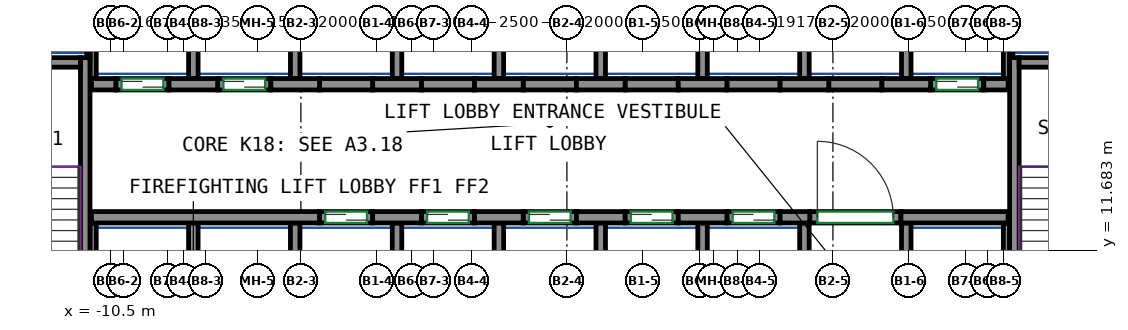
"""IFC4 building model, lengths in metres.
Left out: names, types, materials, properties, quantities, classifications, styles, units other than length and angle.
Written with IfcOpenShell. Run it as: python <this file> out.ifc"""

import sys

from ifc_helpers import new_model, si_unit, direction, frame, frame_2d, origin, place, context, subcontext, project, spatial, rectangle, extrude, source, transform, mapped, element, fill, save


model = new_model("IFC4")
c1 = context("Model", 3, precision=1e-05, world=origin(), true_north=direction((0.0, 1.0)))
c2 = subcontext(c1, "Body", "Model", "MODEL_VIEW")
j1 = project(units=[si_unit("LENGTHUNIT", "METRE"), si_unit("PLANEANGLEUNIT", "RADIAN")], contexts=[c1])
p1 = place(None, origin())
s1 = spatial("IfcSite", under=j1, at=p1, CompositionType="ELEMENT")
p2 = place(p1, origin())
s2 = spatial("IfcBuilding", under=s1, at=p2, CompositionType="ELEMENT")
p3 = place(p2, frame((0.0, 0.0, 75.2)))
s3 = spatial("IfcBuildingStorey", under=s2, at=p3, CompositionType="ELEMENT", Elevation=75.2)
m1 = source(origin(), c2, "Body", "SweptSolid", [
    extrude(rectangle(XDim=7.75, YDim=0.25, at=frame_2d((3.875, 0.0))), origin(), (0.0, 0.0, 1.0), 3.72),
])
p4 = place(p3, frame((-11.175, 9.0, 0.0), z_axis=(0.0, 0.0, 1.0), x_axis=(0.0, 1.0, 0.0)))
e1 = element("IfcWall", 1, at=p4, inside=s3, PredefinedType="SHEAR", context=c2, shape_type="MappedRepresentation", body=[
    mapped(m1, transform((0.0, 0.0, 0.0))),
])
m2 = source(origin(), c2, "Body", "SweptSolid", [
    extrude(rectangle(XDim=3.7, YDim=0.25, at=frame_2d((1.85, 0.0))), origin(), (0.0, 0.0, 1.0), 3.72),
])
p5 = place(p3, frame((-15.0, 16.625, 0.0), z_axis=(0.0, 0.0, 1.0), x_axis=(1.0, 0.0, 0.0)))
e2 = element("IfcWall", 2, at=p5, inside=s3, PredefinedType="SHEAR", context=c2, shape_type="MappedRepresentation", body=[
    mapped(m2, transform((0.0, 0.0, 0.0))),
])
p6 = place(p3, frame((13.275, 9.0, 0.0), z_axis=(0.0, 0.0, 1.0), x_axis=(0.0, 1.0, 0.0)))
e3 = element("IfcWall", 3, at=p6, inside=s3, PredefinedType="SHEAR", context=c2, shape_type="MappedRepresentation", body=[
    mapped(m1, transform((0.0, 0.0, 0.0))),
])
m3 = source(origin(), c2, "Body", "SweptSolid", [
    extrude(rectangle(XDim=3.7, YDim=0.25, at=frame_2d((1.85, 0.0))), origin(), (0.0, 0.0, 1.0), 3.72),
])
p7 = place(p3, frame((13.4, 16.625, 0.0), z_axis=(0.0, 0.0, 1.0), x_axis=(1.0, 0.0, 0.0)))
e4 = element("IfcWall", 4, at=p7, inside=s3, PredefinedType="SHEAR", context=c2, shape_type="MappedRepresentation", body=[
    mapped(m3, transform((0.0, 0.0, 0.0))),
])
m4 = source(origin(), c2, "Body", "SweptSolid", [
    extrude(rectangle(XDim=6.0, YDim=0.3, at=frame_2d((3.0, 0.0))), origin(), (0.0, 0.0, 1.0), 3.72),
])
p8 = place(p3, frame((-11.01, 12.55, 0.0), z_axis=(0.0, 0.0, 1.0), x_axis=(1.0, 0.0, 0.0)))
e5 = element("IfcWall", 5, at=p8, inside=s3, PredefinedType="SHEAR", context=c2, shape_type="MappedRepresentation", body=[
    mapped(m4, transform((0.0, 0.0, 0.0))),
])
m5 = source(origin(), c2, "Body", "SweptSolid", [
    extrude(rectangle(XDim=1.28, YDim=0.3, at=frame_2d((0.64, 0.0))), origin(), (0.0, 0.0, 1.0), 3.72),
])
for number, where, z_axis, x_axis in (
    (6, (-3.61, 12.55, 0.0), (0.0, 0.0, 1.0), (1.0, 0.0, 0.0)),
    (7, (-0.93, 12.55, 0.0), (0.0, 0.0, 1.0), (1.0, 0.0, 0.0)),
    (8, (1.75, 12.55, 0.0), (0.0, 0.0, 1.0), (1.0, 0.0, 0.0)),
    (9, (4.43, 12.55, 0.0), (0.0, 0.0, 1.0), (1.0, 0.0, 0.0)),
):
    element("IfcWall", number, at=place(p3, frame(where, z_axis=z_axis, x_axis=x_axis)), inside=s3, PredefinedType="SHEAR", context=c2, shape_type="MappedRepresentation", body=[
        mapped(m5, transform((0.0, 0.0, 0.0))),
    ])
m6 = source(origin(), c2, "Body", "SweptSolid", [
    extrude(rectangle(XDim=0.78, YDim=0.3, at=frame_2d((0.39, 0.0))), origin(), (0.0, 0.0, 1.0), 3.72),
])
p9 = place(p3, frame((7.11, 12.55, 0.0), z_axis=(0.0, 0.0, 1.0), x_axis=(1.0, 0.0, 0.0)))
e10 = element("IfcWall", 10, at=p9, inside=s3, PredefinedType="SHEAR", context=c2, shape_type="MappedRepresentation", body=[
    mapped(m6, transform((0.0, 0.0, 0.0))),
])
m7 = source(origin(), c2, "Body", "SweptSolid", [
    extrude(rectangle(XDim=2.82, YDim=0.3, at=frame_2d((1.41, 0.0))), origin(), (0.0, 0.0, 1.0), 3.72),
])
p10 = place(p3, frame((10.29, 12.55, 0.0), z_axis=(0.0, 0.0, 1.0), x_axis=(1.0, 0.0, 0.0)))
e11 = element("IfcWall", 11, at=p10, inside=s3, PredefinedType="SHEAR", context=c2, shape_type="MappedRepresentation", body=[
    mapped(m7, transform((0.0, 0.0, 0.0))),
])
m8 = source(origin(), c2, "Body", "SweptSolid", [
    extrude(rectangle(XDim=0.64, YDim=0.3, at=frame_2d((0.32, 0.0))), origin(), (0.0, 0.0, 1.0), 3.72),
])
p11 = place(p3, frame((-11.01, 16.05, 0.0), z_axis=(0.0, 0.0, 1.0), x_axis=(1.0, 0.0, 0.0)))
e12 = element("IfcWall", 12, at=p11, inside=s3, PredefinedType="SHEAR", context=c2, shape_type="MappedRepresentation", body=[
    mapped(m8, transform((0.0, 0.0, 0.0))),
])
for number, where, z_axis, x_axis in (
    (13, (-8.97, 16.05, 0.0), (0.0, 0.0, 1.0), (1.0, 0.0, 0.0)),
    (14, (-6.29, 16.05, 0.0), (0.0, 0.0, 1.0), (1.0, 0.0, 0.0)),
    (15, (-3.61, 16.05, 0.0), (0.0, 0.0, 1.0), (1.0, 0.0, 0.0)),
    (16, (-0.93, 16.05, 0.0), (0.0, 0.0, 1.0), (1.0, 0.0, 0.0)),
    (17, (1.75, 16.05, 0.0), (0.0, 0.0, 1.0), (1.0, 0.0, 0.0)),
    (18, (4.43, 16.05, 0.0), (0.0, 0.0, 1.0), (1.0, 0.0, 0.0)),
):
    element("IfcWall", number, at=place(p3, frame(where, z_axis=z_axis, x_axis=x_axis)), inside=s3, PredefinedType="SHEAR", context=c2, shape_type="MappedRepresentation", body=[
        mapped(m5, transform((0.0, 0.0, 0.0))),
    ])
m9 = source(origin(), c2, "Body", "SweptSolid", [
    extrude(rectangle(XDim=1.28, YDim=0.3, at=frame_2d((0.64, 0.0))), origin(), (0.0, 0.0, 1.0), 3.72),
])
p12 = place(p3, frame((7.11, 16.05, 0.0), z_axis=(0.0, 0.0, 1.0), x_axis=(1.0, 0.0, 0.0)))
e19 = element("IfcWall", 19, at=p12, inside=s3, PredefinedType="SHEAR", context=c2, shape_type="MappedRepresentation", body=[
    mapped(m9, transform((0.0, 0.0, 0.0))),
])
p13 = place(p3, frame((9.79, 16.05, 0.0), z_axis=(0.0, 0.0, 1.0), x_axis=(1.0, 0.0, 0.0)))
e20 = element("IfcWall", 20, at=p13, inside=s3, PredefinedType="SHEAR", context=c2, shape_type="MappedRepresentation", body=[
    mapped(m5, transform((0.0, 0.0, 0.0))),
])
m10 = source(origin(), c2, "Body", "SweptSolid", [
    extrude(rectangle(XDim=0.64, YDim=0.3, at=frame_2d((0.32, 0.0))), origin(), (0.0, 0.0, 1.0), 3.72),
])
p14 = place(p3, frame((12.47, 16.05, 0.0), z_axis=(0.0, 0.0, 1.0), x_axis=(1.0, 0.0, 0.0)))
e21 = element("IfcWall", 21, at=p14, inside=s3, PredefinedType="SHEAR", context=c2, shape_type="MappedRepresentation", body=[
    mapped(m10, transform((0.0, 0.0, 0.0))),
])
m11 = source(origin(), c2, "Body", "SweptSolid", [
    extrude(rectangle(XDim=1.4, YDim=0.3, at=frame_2d((0.7, 0.0))), origin(), (0.0, 0.0, 1.0), 3.72),
])
p15 = place(p3, frame((-5.01, 12.55, 0.0), z_axis=(0.0, 0.0, 1.0), x_axis=(1.0, 0.0, 0.0)))
e22 = element("IfcWall", 22, at=p15, inside=s3, PredefinedType="PARTITIONING", context=c2, shape_type="MappedRepresentation", body=[
    mapped(m11, transform((0.0, 0.0, 0.0))),
])
p16 = place(p15, frame((0.15, 0.0, 0.0)))
e23 = element("IfcOpeningElement", 23, at=p16, cuts=e22, PredefinedType="OPENING", context=c2, shape_type="SweptSolid", body=[
    extrude(rectangle(XDim=1.1, YDim=2.1, at=frame_2d((0.55, 1.05))), frame((0.0, 0.16, 0.0), z_axis=(0.0, -1.0, 0.0), x_axis=(1.0, 0.0, 0.0)), (0.0, 0.0, 1.0), 0.32),
])
m12 = source(origin(), c2, "Body", "SweptSolid", [
    extrude(rectangle(XDim=1.4, YDim=0.3, at=frame_2d((0.7, 0.0))), origin(), (0.0, 0.0, 1.0), 3.72),
])
p17 = place(p3, frame((-2.33, 12.55, 0.0), z_axis=(0.0, 0.0, 1.0), x_axis=(1.0, 0.0, 0.0)))
e24 = element("IfcWall", 24, at=p17, inside=s3, PredefinedType="PARTITIONING", context=c2, shape_type="MappedRepresentation", body=[
    mapped(m12, transform((0.0, 0.0, 0.0))),
])
p18 = place(p17, frame((0.15, 0.0, 0.0)))
e25 = element("IfcOpeningElement", 25, at=p18, cuts=e24, PredefinedType="OPENING", context=c2, shape_type="SweptSolid", body=[
    extrude(rectangle(XDim=1.1, YDim=2.1, at=frame_2d((0.55, 1.05))), frame((0.0, 0.16, 0.0), z_axis=(0.0, -1.0, 0.0), x_axis=(1.0, 0.0, 0.0)), (0.0, 0.0, 1.0), 0.32),
])
p19 = place(p3, frame((0.35, 12.55, 0.0), z_axis=(0.0, 0.0, 1.0), x_axis=(1.0, 0.0, 0.0)))
e26 = element("IfcWall", 26, at=p19, inside=s3, PredefinedType="PARTITIONING", context=c2, shape_type="MappedRepresentation", body=[
    mapped(m11, transform((0.0, 0.0, 0.0))),
])
p20 = place(p19, frame((0.15, 0.0, 0.0)))
e27 = element("IfcOpeningElement", 27, at=p20, cuts=e26, PredefinedType="OPENING", context=c2, shape_type="SweptSolid", body=[
    extrude(rectangle(XDim=1.1, YDim=2.1, at=frame_2d((0.55, 1.05))), frame((0.0, 0.16, 0.0), z_axis=(0.0, -1.0, 0.0), x_axis=(1.0, 0.0, 0.0)), (0.0, 0.0, 1.0), 0.32),
])
p21 = place(p3, frame((3.03, 12.55, 0.0), z_axis=(0.0, 0.0, 1.0), x_axis=(1.0, 0.0, 0.0)))
e28 = element("IfcWall", 28, at=p21, inside=s3, PredefinedType="PARTITIONING", context=c2, shape_type="MappedRepresentation", body=[
    mapped(m11, transform((0.0, 0.0, 0.0))),
])
p22 = place(p21, frame((0.15, 0.0, 0.0)))
e29 = element("IfcOpeningElement", 29, at=p22, cuts=e28, PredefinedType="OPENING", context=c2, shape_type="SweptSolid", body=[
    extrude(rectangle(XDim=1.1, YDim=2.1, at=frame_2d((0.55, 1.05))), frame((0.0, 0.16, 0.0), z_axis=(0.0, -1.0, 0.0), x_axis=(1.0, 0.0, 0.0)), (0.0, 0.0, 1.0), 0.32),
])
p23 = place(p3, frame((5.71, 12.55, 0.0), z_axis=(0.0, 0.0, 1.0), x_axis=(1.0, 0.0, 0.0)))
e30 = element("IfcWall", 30, at=p23, inside=s3, PredefinedType="PARTITIONING", context=c2, shape_type="MappedRepresentation", body=[
    mapped(m12, transform((0.0, 0.0, 0.0))),
])
p24 = place(p23, frame((0.15, 0.0, 0.0)))
e31 = element("IfcOpeningElement", 31, at=p24, cuts=e30, PredefinedType="OPENING", context=c2, shape_type="SweptSolid", body=[
    extrude(rectangle(XDim=1.1, YDim=2.1, at=frame_2d((0.55, 1.05))), frame((0.0, 0.16, 0.0), z_axis=(0.0, -1.0, 0.0), x_axis=(1.0, 0.0, 0.0)), (0.0, 0.0, 1.0), 0.32),
])
p25 = place(p3, frame((11.07, 16.05, 0.0), z_axis=(0.0, 0.0, 1.0), x_axis=(1.0, 0.0, 0.0)))
e32 = element("IfcWall", 32, at=p25, inside=s3, PredefinedType="PARTITIONING", context=c2, shape_type="MappedRepresentation", body=[
    mapped(m11, transform((0.0, 0.0, 0.0))),
])
p26 = place(p25, frame((0.15, 0.0, 0.0)))
e33 = element("IfcOpeningElement", 33, at=p26, cuts=e32, PredefinedType="OPENING", context=c2, shape_type="SweptSolid", body=[
    extrude(rectangle(XDim=1.1, YDim=2.1, at=frame_2d((0.55, 1.05))), frame((0.0, 0.16, 0.0), z_axis=(0.0, -1.0, 0.0), x_axis=(1.0, 0.0, 0.0)), (0.0, 0.0, 1.0), 0.32),
])
p27 = place(p3, frame((-10.37, 16.05, 0.0), z_axis=(0.0, 0.0, 1.0), x_axis=(1.0, 0.0, 0.0)))
e34 = element("IfcWall", 34, at=p27, inside=s3, PredefinedType="PARTITIONING", context=c2, shape_type="MappedRepresentation", body=[
    mapped(m12, transform((0.0, 0.0, 0.0))),
])
p28 = place(p27, frame((0.15, 0.0, 0.0)))
e35 = element("IfcOpeningElement", 35, at=p28, cuts=e34, PredefinedType="OPENING", context=c2, shape_type="SweptSolid", body=[
    extrude(rectangle(XDim=1.1, YDim=2.1, at=frame_2d((0.55, 1.05))), frame((0.0, 0.16, 0.0), z_axis=(0.0, -1.0, 0.0), x_axis=(1.0, 0.0, 0.0)), (0.0, 0.0, 1.0), 0.32),
])
p29 = place(p3, frame((-7.69, 16.05, 0.0), z_axis=(0.0, 0.0, 1.0), x_axis=(1.0, 0.0, 0.0)))
e36 = element("IfcWall", 36, at=p29, inside=s3, PredefinedType="PARTITIONING", context=c2, shape_type="MappedRepresentation", body=[
    mapped(m11, transform((0.0, 0.0, 0.0))),
])
p30 = place(p29, frame((0.15, 0.0, 0.0)))
e37 = element("IfcOpeningElement", 37, at=p30, cuts=e36, PredefinedType="OPENING", context=c2, shape_type="SweptSolid", body=[
    extrude(rectangle(XDim=1.1, YDim=2.1, at=frame_2d((0.55, 1.05))), frame((0.0, 0.16, 0.0), z_axis=(0.0, -1.0, 0.0), x_axis=(1.0, 0.0, 0.0)), (0.0, 0.0, 1.0), 0.32),
])
m13 = source(origin(), c2, "Body", "SweptSolid", [
    extrude(rectangle(XDim=2.4, YDim=0.3, at=frame_2d((1.2, 0.0))), origin(), (0.0, 0.0, 1.0), 3.72),
])
p31 = place(p3, frame((7.89, 12.55, 0.0), z_axis=(0.0, 0.0, 1.0), x_axis=(1.0, 0.0, 0.0)))
e38 = element("IfcWall", 38, at=p31, inside=s3, PredefinedType="PARTITIONING", context=c2, shape_type="MappedRepresentation", body=[
    mapped(m13, transform((0.0, 0.0, 0.0))),
])
p32 = place(p31, frame((0.2, 0.0, 0.0)))
e39 = element("IfcOpeningElement", 39, at=p32, cuts=e38, PredefinedType="OPENING", context=c2, shape_type="SweptSolid", body=[
    extrude(rectangle(XDim=2.0, YDim=2.1, at=frame_2d((1.0, 1.05))), frame((0.0, 0.16, 0.0), z_axis=(0.0, -1.0, 0.0), x_axis=(1.0, 0.0, 0.0)), (0.0, 0.0, 1.0), 0.32),
])
p33 = place(p3, frame((-5.01, 16.05, 0.0), z_axis=(0.0, 0.0, 1.0), x_axis=(1.0, 0.0, 0.0)))
e40 = element("IfcWall", 40, at=p33, inside=s3, PredefinedType="PARTITIONING", context=c2, shape_type="MappedRepresentation", body=[
    mapped(m11, transform((0.0, 0.0, 0.0))),
])
p34 = place(p3, frame((-2.33, 16.05, 0.0), z_axis=(0.0, 0.0, 1.0), x_axis=(1.0, 0.0, 0.0)))
e41 = element("IfcWall", 41, at=p34, inside=s3, PredefinedType="PARTITIONING", context=c2, shape_type="MappedRepresentation", body=[
    mapped(m12, transform((0.0, 0.0, 0.0))),
])
for number, where, z_axis, x_axis in (
    (42, (0.35, 16.05, 0.0), (0.0, 0.0, 1.0), (1.0, 0.0, 0.0)),
    (43, (3.03, 16.05, 0.0), (0.0, 0.0, 1.0), (1.0, 0.0, 0.0)),
):
    element("IfcWall", number, at=place(p3, frame(where, z_axis=z_axis, x_axis=x_axis)), inside=s3, PredefinedType="PARTITIONING", context=c2, shape_type="MappedRepresentation", body=[
        mapped(m11, transform((0.0, 0.0, 0.0))),
    ])
for number, where, z_axis, x_axis in (
    (44, (5.71, 16.05, 0.0), (0.0, 0.0, 1.0), (1.0, 0.0, 0.0)),
    (45, (8.39, 16.05, 0.0), (0.0, 0.0, 1.0), (1.0, 0.0, 0.0)),
):
    element("IfcWall", number, at=place(p3, frame(where, z_axis=z_axis, x_axis=x_axis)), inside=s3, PredefinedType="PARTITIONING", context=c2, shape_type="MappedRepresentation", body=[
        mapped(m12, transform((0.0, 0.0, 0.0))),
    ])
m14 = source(origin(), c2, "Body", "SweptSolid", [
    extrude(rectangle(XDim=3.275, YDim=0.165, at=frame_2d((1.638, 0.0))), origin(), (0.0, 0.0, 1.0), 3.72),
])
for number, where, z_axis, x_axis in (
    (46, (13.067, 16.2, 0.0), (0.0, 0.0, 1.0), (0.0, 1.0, 0.0)),
    (47, (-10.968, 16.2, 0.0), (0.0, 0.0, 1.0), (0.0, 1.0, 0.0)),
):
    element("IfcWall", number, at=place(p3, frame(where, z_axis=z_axis, x_axis=x_axis)), inside=s3, PredefinedType="PARTITIONING", context=c2, shape_type="MappedRepresentation", body=[
        mapped(m14, transform((0.0, 0.0, 0.0))),
    ])
m15 = source(origin(), c2, "Body", "SweptSolid", [
    extrude(rectangle(XDim=3.275, YDim=0.25, at=frame_2d((1.638, 0.0))), origin(), (0.0, 0.0, 1.0), 3.72),
])
p35 = place(p3, frame((10.43, 16.2, 0.0), z_axis=(0.0, 0.0, 1.0), x_axis=(0.0, 1.0, 0.0)))
e48 = element("IfcWall", 48, at=p35, inside=s3, PredefinedType="PARTITIONING", context=c2, shape_type="MappedRepresentation", body=[
    mapped(m15, transform((0.0, 0.0, 0.0))),
])
m16 = source(origin(), c2, "Body", "SweptSolid", [
    extrude(rectangle(XDim=2.725, YDim=0.085, at=frame_2d((1.363, 0.0))), origin(), (0.0, 0.0, 1.0), 3.72),
])
p36 = place(p3, frame((13.192, 16.75, 0.0), z_axis=(0.0, 0.0, 1.0), x_axis=(0.0, 1.0, 0.0)))
e49 = element("IfcWall", 49, at=p36, inside=s3, PredefinedType="PARTITIONING", context=c2, shape_type="MappedRepresentation", body=[
    mapped(m16, transform((0.0, 0.0, 0.0))),
])
for number, where, z_axis, x_axis in (
    (50, (2.39, 16.2, 0.0), (0.0, 0.0, 1.0), (0.0, 1.0, 0.0)),
    (51, (5.07, 16.2, 0.0), (0.0, 0.0, 1.0), (0.0, 1.0, 0.0)),
    (52, (7.75, 16.2, 0.0), (0.0, 0.0, 1.0), (0.0, 1.0, 0.0)),
    (53, (-0.29, 16.2, 0.0), (0.0, 0.0, 1.0), (0.0, 1.0, 0.0)),
):
    element("IfcWall", number, at=place(p3, frame(where, z_axis=z_axis, x_axis=x_axis)), inside=s3, PredefinedType="PARTITIONING", context=c2, shape_type="MappedRepresentation", body=[
        mapped(m15, transform((0.0, 0.0, 0.0))),
    ])
p37 = place(p3, frame((-11.093, 16.75, 0.0), z_axis=(0.0, 0.0, 1.0), x_axis=(0.0, 1.0, 0.0)))
e54 = element("IfcWall", 54, at=p37, inside=s3, PredefinedType="PARTITIONING", context=c2, shape_type="MappedRepresentation", body=[
    mapped(m16, transform((0.0, 0.0, 0.0))),
])
for number, where, z_axis, x_axis in (
    (55, (-2.97, 16.2, 0.0), (0.0, 0.0, 1.0), (0.0, 1.0, 0.0)),
    (56, (-5.65, 16.2, 0.0), (0.0, 0.0, 1.0), (0.0, 1.0, 0.0)),
    (57, (-8.33, 16.2, 0.0), (0.0, 0.0, 1.0), (0.0, 1.0, 0.0)),
):
    element("IfcWall", number, at=place(p3, frame(where, z_axis=z_axis, x_axis=x_axis)), inside=s3, PredefinedType="PARTITIONING", context=c2, shape_type="MappedRepresentation", body=[
        mapped(m15, transform((0.0, 0.0, 0.0))),
    ])
m17 = source(origin(), c2, "Body", "SweptSolid", [
    extrude(rectangle(XDim=3.4, YDim=0.25, at=frame_2d((1.7, 0.0))), origin(), (0.0, 0.0, 1.0), 3.72),
])
p38 = place(p3, frame((10.43, 9.0, 0.0), z_axis=(0.0, 0.0, 1.0), x_axis=(0.0, 1.0, 0.0)))
e58 = element("IfcWall", 58, at=p38, inside=s3, PredefinedType="PARTITIONING", context=c2, shape_type="MappedRepresentation", body=[
    mapped(m17, transform((0.0, 0.0, 0.0))),
])
m18 = source(origin(), c2, "Body", "SweptSolid", [
    extrude(rectangle(XDim=3.4, YDim=0.165, at=frame_2d((1.7, 0.0))), origin(), (0.0, 0.0, 1.0), 3.72),
])
p39 = place(p3, frame((13.067, 9.0, 0.0), z_axis=(0.0, 0.0, 1.0), x_axis=(0.0, 1.0, 0.0)))
e59 = element("IfcWall", 59, at=p39, inside=s3, PredefinedType="PARTITIONING", context=c2, shape_type="MappedRepresentation", body=[
    mapped(m18, transform((0.0, 0.0, 0.0))),
])
for number, where, z_axis, x_axis in (
    (60, (2.39, 9.0, 0.0), (0.0, 0.0, 1.0), (0.0, 1.0, 0.0)),
    (61, (5.07, 9.0, 0.0), (0.0, 0.0, 1.0), (0.0, 1.0, 0.0)),
    (62, (7.75, 9.0, 0.0), (0.0, 0.0, 1.0), (0.0, 1.0, 0.0)),
    (63, (-0.29, 9.0, 0.0), (0.0, 0.0, 1.0), (0.0, 1.0, 0.0)),
):
    element("IfcWall", number, at=place(p3, frame(where, z_axis=z_axis, x_axis=x_axis)), inside=s3, PredefinedType="PARTITIONING", context=c2, shape_type="MappedRepresentation", body=[
        mapped(m17, transform((0.0, 0.0, 0.0))),
    ])
p40 = place(p3, frame((-10.968, 9.0, 0.0), z_axis=(0.0, 0.0, 1.0), x_axis=(0.0, 1.0, 0.0)))
e64 = element("IfcWall", 64, at=p40, inside=s3, PredefinedType="PARTITIONING", context=c2, shape_type="MappedRepresentation", body=[
    mapped(m18, transform((0.0, 0.0, 0.0))),
])
for number, where, z_axis, x_axis in (
    (65, (-2.97, 9.0, 0.0), (0.0, 0.0, 1.0), (0.0, 1.0, 0.0)),
    (66, (-5.65, 9.0, 0.0), (0.0, 0.0, 1.0), (0.0, 1.0, 0.0)),
    (67, (-8.33, 9.0, 0.0), (0.0, 0.0, 1.0), (0.0, 1.0, 0.0)),
):
    element("IfcWall", number, at=place(p3, frame(where, z_axis=z_axis, x_axis=x_axis)), inside=s3, PredefinedType="PARTITIONING", context=c2, shape_type="MappedRepresentation", body=[
        mapped(m17, transform((0.0, 0.0, 0.0))),
    ])
p41 = place(p32, origin())
e68 = element("IfcDoor", 68, at=p41, inside=s3, OperationType="DOUBLE_DOOR_SINGLE_SWING", PredefinedType="DOOR", context=c2, shape_type="SweptSolid", body=[
    extrude(rectangle(XDim=2.0, YDim=2.1, at=frame_2d((1.0, 1.05))), frame((0.0, 0.025, 0.0), z_axis=(0.0, -1.0, 0.0), x_axis=(1.0, 0.0, 0.0)), (0.0, 0.0, 1.0), 0.05),
])
fill(e39, e68)
p42 = place(p16, origin())
e69 = element("IfcDoor", 69, at=p42, inside=s3, OperationType="DOUBLE_DOOR_SLIDING", PredefinedType="DOOR", context=c2, shape_type="SweptSolid", body=[
    extrude(rectangle(XDim=1.1, YDim=2.1, at=frame_2d((0.55, 1.05))), frame((0.0, 0.025, 0.0), z_axis=(0.0, -1.0, 0.0), x_axis=(1.0, 0.0, 0.0)), (0.0, 0.0, 1.0), 0.05),
])
fill(e23, e69)
p43 = place(p18, origin())
e70 = element("IfcDoor", 70, at=p43, inside=s3, OperationType="DOUBLE_DOOR_SLIDING", PredefinedType="DOOR", context=c2, shape_type="SweptSolid", body=[
    extrude(rectangle(XDim=1.1, YDim=2.1, at=frame_2d((0.55, 1.05))), frame((0.0, 0.025, 0.0), z_axis=(0.0, -1.0, 0.0), x_axis=(1.0, 0.0, 0.0)), (0.0, 0.0, 1.0), 0.05),
])
fill(e25, e70)
p44 = place(p20, origin())
e71 = element("IfcDoor", 71, at=p44, inside=s3, OperationType="DOUBLE_DOOR_SLIDING", PredefinedType="DOOR", context=c2, shape_type="SweptSolid", body=[
    extrude(rectangle(XDim=1.1, YDim=2.1, at=frame_2d((0.55, 1.05))), frame((0.0, 0.025, 0.0), z_axis=(0.0, -1.0, 0.0), x_axis=(1.0, 0.0, 0.0)), (0.0, 0.0, 1.0), 0.05),
])
fill(e27, e71)
p45 = place(p22, origin())
e72 = element("IfcDoor", 72, at=p45, inside=s3, OperationType="DOUBLE_DOOR_SLIDING", PredefinedType="DOOR", context=c2, shape_type="SweptSolid", body=[
    extrude(rectangle(XDim=1.1, YDim=2.1, at=frame_2d((0.55, 1.05))), frame((0.0, 0.025, 0.0), z_axis=(0.0, -1.0, 0.0), x_axis=(1.0, 0.0, 0.0)), (0.0, 0.0, 1.0), 0.05),
])
fill(e29, e72)
p46 = place(p24, origin())
e73 = element("IfcDoor", 73, at=p46, inside=s3, OperationType="DOUBLE_DOOR_SLIDING", PredefinedType="DOOR", context=c2, shape_type="SweptSolid", body=[
    extrude(rectangle(XDim=1.1, YDim=2.1, at=frame_2d((0.55, 1.05))), frame((0.0, 0.025, 0.0), z_axis=(0.0, -1.0, 0.0), x_axis=(1.0, 0.0, 0.0)), (0.0, 0.0, 1.0), 0.05),
])
fill(e31, e73)
p47 = place(p26, origin())
e74 = element("IfcDoor", 74, at=p47, inside=s3, OperationType="DOUBLE_DOOR_SLIDING", PredefinedType="DOOR", context=c2, shape_type="SweptSolid", body=[
    extrude(rectangle(XDim=1.1, YDim=2.1, at=frame_2d((0.55, 1.05))), frame((0.0, 0.025, 0.0), z_axis=(0.0, -1.0, 0.0), x_axis=(1.0, 0.0, 0.0)), (0.0, 0.0, 1.0), 0.05),
])
fill(e33, e74)
p48 = place(p28, origin())
e75 = element("IfcDoor", 75, at=p48, inside=s3, OperationType="DOUBLE_DOOR_SLIDING", PredefinedType="DOOR", context=c2, shape_type="SweptSolid", body=[
    extrude(rectangle(XDim=1.1, YDim=2.1, at=frame_2d((0.55, 1.05))), frame((0.0, 0.025, 0.0), z_axis=(0.0, -1.0, 0.0), x_axis=(1.0, 0.0, 0.0)), (0.0, 0.0, 1.0), 0.05),
])
fill(e35, e75)
p49 = place(p30, origin())
e76 = element("IfcDoor", 76, at=p49, inside=s3, OperationType="DOUBLE_DOOR_SLIDING", PredefinedType="DOOR", context=c2, shape_type="SweptSolid", body=[
    extrude(rectangle(XDim=1.1, YDim=2.1, at=frame_2d((0.55, 1.05))), frame((0.0, 0.025, 0.0), z_axis=(0.0, -1.0, 0.0), x_axis=(1.0, 0.0, 0.0)), (0.0, 0.0, 1.0), 0.05),
])
fill(e37, e76)
save(model, sys.argv[1])
